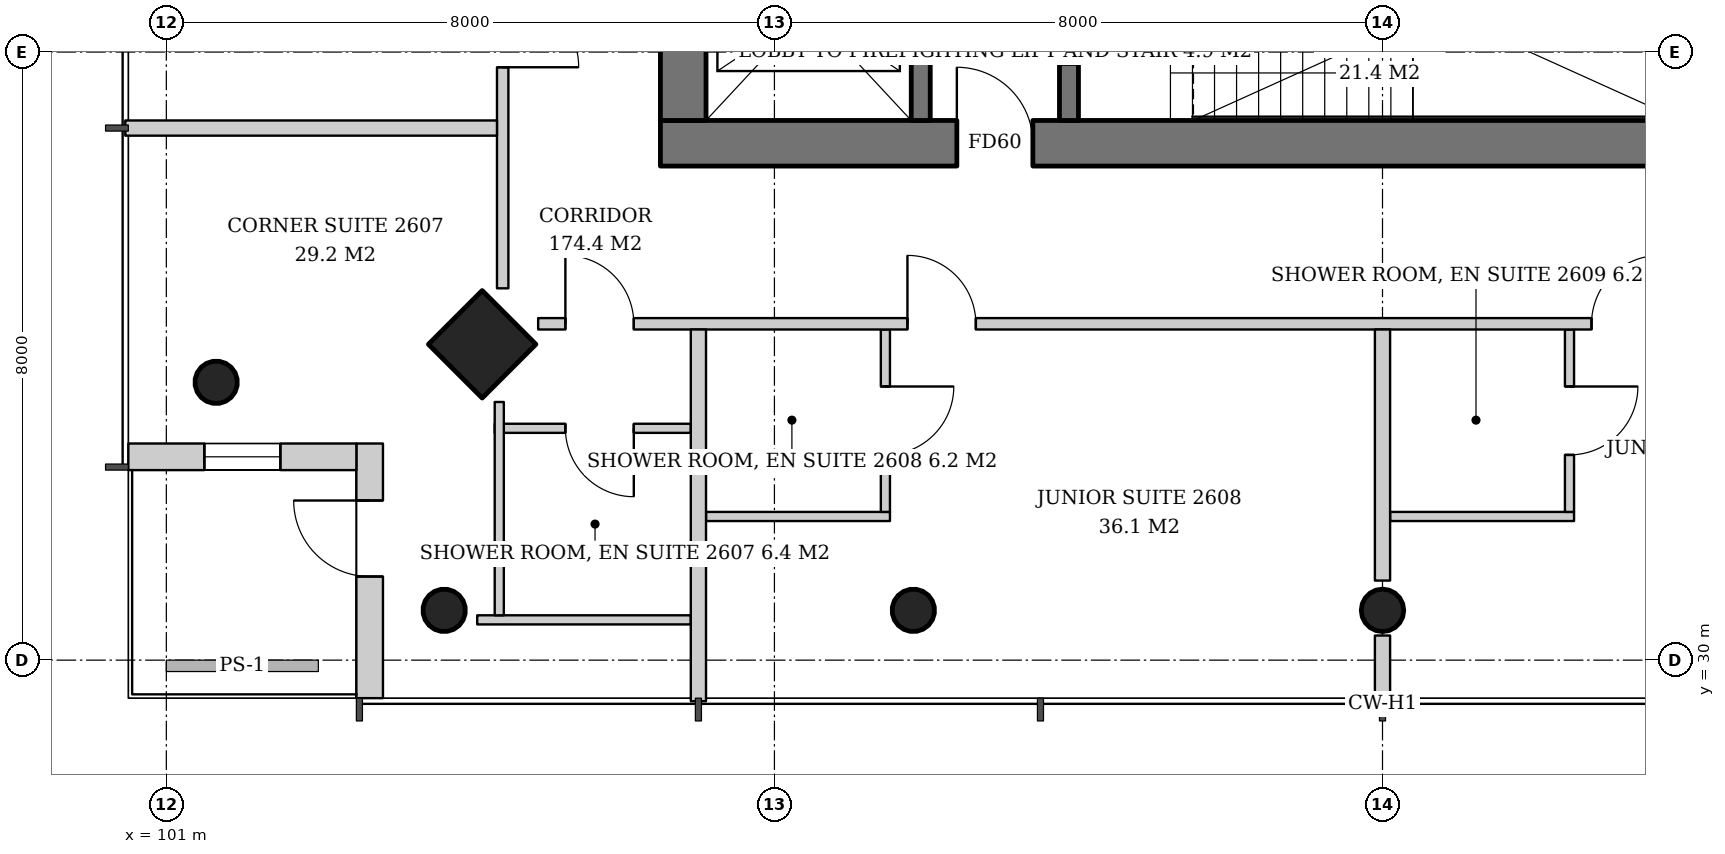
"""IFC4 building model, lengths in metres.
Left out: names, types, materials, properties, quantities, classifications, styles, units other than length and angle.
Written with IfcOpenShell. Run it as: python <this file> out.ifc"""

import sys

from ifc_helpers import new_model, si_unit, direction, frame, frame_2d, origin, origin_2d, place, context, subcontext, project, spatial, rectangle, hollow_circle, extrude, element, fill, save


model = new_model("IFC4")
c1 = context("Model", 3, precision=1e-05, world=origin(), true_north=direction((0.0, 1.0)))
c2 = subcontext(c1, "Body", "Model", "MODEL_VIEW")
j1 = project(units=[si_unit("LENGTHUNIT", "METRE"), si_unit("PLANEANGLEUNIT", "RADIAN")], contexts=[c1])
p1 = place(None, origin())
s1 = spatial("IfcSite", under=j1, at=p1, CompositionType="ELEMENT")
p2 = place(p1, origin())
s2 = spatial("IfcBuilding", under=s1, at=p2, CompositionType="ELEMENT")
p3 = place(p2, frame((0.0, 0.0, 104.6)))
s3 = spatial("IfcBuildingStorey", under=s2, at=p3, CompositionType="ELEMENT", Elevation=104.6)
p4 = place(p3, frame((105.104, 34.104, 0.0), z_axis=(0.043032401563, 0.043032401563, 0.998146494675), x_axis=(-0.707106781187, 0.707106781187, 0.0)))
e1 = element("IfcColumn", 1, at=p4, inside=s3, PredefinedType="COLUMN", context=c2, shape_type="SweptSolid", body=[
    extrude(rectangle(XDim=1.0, YDim=1.0, at=origin_2d()), origin(), (0.0, 0.0, 1.0), 3.807),
])
for number, where, z_axis, x_axis in (
    (2, (101.604, 33.604, 0.0), (0.043, 0.043, 0.998), (-0.707, 0.707, 0.0)),
    (3, (104.604, 30.604, 0.0), (0.043, 0.043, 0.998), (-0.707, 0.707, 0.0)),
):
    element("IfcColumn", number, at=place(p3, frame(where, z_axis=z_axis, x_axis=x_axis)), inside=s3, PredefinedType="COLUMN", context=c2, shape_type="SweptSolid", body=[
        extrude(hollow_circle(Radius=0.28, WallThickness=0.02, at=origin_2d()), origin(), (0.0, 0.0, 1.0), 3.807),
    ])
p5 = place(p3, frame((110.802, 30.604, 0.0), z_axis=(0.02149908433, 0.04306234503, 0.998841040313), x_axis=(-0.894693706707, 0.446680166538, 0.0)))
e4 = element("IfcColumn", 4, at=p5, inside=s3, PredefinedType="COLUMN", context=c2, shape_type="SweptSolid", body=[
    extrude(hollow_circle(Radius=0.28, WallThickness=0.02, at=origin_2d()), origin(), (0.0, 0.0, 1.0), 3.804),
])
p6 = place(p3, frame((117.0, 30.604, 0.0), z_axis=(0.0, 0.043072300418, 0.999071957837), x_axis=(-1.0, 0.0, 0.0)))
e5 = element("IfcColumn", 5, at=p6, inside=s3, PredefinedType="COLUMN", context=c2, shape_type="SweptSolid", body=[
    extrude(hollow_circle(Radius=0.28, WallThickness=0.02, at=origin_2d()), origin(), (0.0, 0.0, 1.0), 3.803),
])
p7 = place(p3, frame((107.5, 36.8, 0.0), z_axis=(0.0, 0.0, 1.0), x_axis=(1.0, 0.0, 0.0)))
e6 = element("IfcWall", 6, at=p7, inside=s3, PredefinedType="SHEAR", context=c2, shape_type="SweptSolid", body=[
    extrude(rectangle(XDim=19.0, YDim=0.6, at=frame_2d((9.5, 0.0))), origin(), (0.0, 0.0, 1.0), 3.8),
])
p8 = place(p7, frame((3.9, 0.0, 0.0)))
e7 = element("IfcOpeningElement", 7, at=p8, cuts=e6, PredefinedType="OPENING", context=c2, shape_type="SweptSolid", body=[
    extrude(rectangle(XDim=1.0, YDim=2.1, at=frame_2d((0.5, 1.05))), frame((0.0, 0.31, 0.0), z_axis=(0.0, -1.0, 0.0), x_axis=(1.0, 0.0, 0.0)), (0.0, 0.0, 1.0), 0.62),
])
p9 = place(p7, frame((14.792, 0.0, 0.0)))
e8 = element("IfcOpeningElement", 8, at=p9, cuts=e6, PredefinedType="OPENING", context=c2, shape_type="SweptSolid", body=[
    extrude(rectangle(XDim=1.0, YDim=2.1, at=frame_2d((0.5, 1.05))), frame((0.0, 0.31, 0.0), z_axis=(0.0, -1.0, 0.0), x_axis=(1.0, 0.0, 0.0)), (0.0, 0.0, 1.0), 0.62),
])
p10 = place(p7, frame((17.005, 0.0, 0.0)))
e9 = element("IfcOpeningElement", 9, at=p10, cuts=e6, PredefinedType="OPENING", context=c2, shape_type="SweptSolid", body=[
    extrude(rectangle(XDim=1.0, YDim=2.1, at=frame_2d((0.5, 1.05))), frame((0.0, 0.31, 0.0), z_axis=(0.0, -1.0, 0.0), x_axis=(1.0, 0.0, 0.0)), (0.0, 0.0, 1.0), 0.62),
])
p11 = place(p3, frame((107.8, 37.1, 0.0), z_axis=(0.0, 0.0, 1.0), x_axis=(0.0, 1.0, 0.0)))
e10 = element("IfcWall", 10, at=p11, inside=s3, PredefinedType="SHEAR", context=c2, shape_type="SweptSolid", body=[
    extrude(rectangle(XDim=17.8, YDim=0.6, at=frame_2d((8.9, 0.0))), origin(), (0.0, 0.0, 1.0), 3.8),
])
p12 = place(p11, frame((8.0, 0.0, 0.0)))
e11 = element("IfcOpeningElement", 11, at=p12, cuts=e10, PredefinedType="OPENING", context=c2, shape_type="SweptSolid", body=[
    extrude(rectangle(XDim=1.8, YDim=2.4, at=frame_2d((0.9, 1.2))), frame((0.0, 0.31, 0.0), z_axis=(0.0, -1.0, 0.0), x_axis=(1.0, 0.0, 0.0)), (0.0, 0.0, 1.0), 0.62),
])
p13 = place(p3, frame((103.675, 29.5, 0.0), z_axis=(0.0, 0.0, 1.0), x_axis=(0.0, 1.0, 0.0)))
e12 = element("IfcWall", 12, at=p13, inside=s3, PredefinedType="SOLIDWALL", context=c2, shape_type="SweptSolid", body=[
    extrude(rectangle(XDim=3.35, YDim=0.35, at=frame_2d((1.675, 0.0))), origin(), (0.0, 0.0, 1.0), 3.6),
])
p14 = place(p13, frame((1.6, 0.0, 0.0)))
e13 = element("IfcOpeningElement", 13, at=p14, cuts=e12, PredefinedType="OPENING", context=c2, shape_type="SweptSolid", body=[
    extrude(rectangle(XDim=1.0, YDim=2.4, at=frame_2d((0.5, 1.2))), frame((0.0, 0.185, 0.0), z_axis=(0.0, -1.0, 0.0), x_axis=(1.0, 0.0, 0.0)), (0.0, 0.0, 1.0), 0.37),
])
p15 = place(p3, frame((103.5, 32.675, 0.0), z_axis=(0.0, 0.0, 1.0), x_axis=(-1.0, 0.0, 0.0)))
e14 = element("IfcWall", 14, at=p15, inside=s3, PredefinedType="SOLIDWALL", context=c2, shape_type="SweptSolid", body=[
    extrude(rectangle(XDim=3.0, YDim=0.35, at=frame_2d((1.5, 0.0))), origin(), (0.0, 0.0, 1.0), 3.6),
])
p16 = place(p15, frame((1.0, 0.0, 0.9)))
e15 = element("IfcOpeningElement", 15, at=p16, cuts=e14, PredefinedType="OPENING", context=c2, shape_type="SweptSolid", body=[
    extrude(rectangle(XDim=1.0, YDim=2.4, at=frame_2d((0.5, 1.2))), frame((0.0, 0.185, 0.0), z_axis=(0.0, -1.0, 0.0), x_axis=(1.0, 0.0, 0.0)), (0.0, 0.0, 1.0), 0.37),
])
p17 = place(p3, frame((110.925, 37.1, 0.0), z_axis=(0.0, 0.0, 1.0), x_axis=(0.0, 1.0, 0.0)))
e16 = element("IfcWall", 16, at=p17, inside=s3, PredefinedType="SHEAR", context=c2, shape_type="SweptSolid", body=[
    extrude(rectangle(XDim=2.9, YDim=0.25, at=frame_2d((1.45, 0.0))), origin(), (0.0, 0.0, 1.0), 3.8),
])
p18 = place(p17, frame((0.8, 0.0, 0.0)))
e17 = element("IfcOpeningElement", 17, at=p18, cuts=e16, PredefinedType="OPENING", context=c2, shape_type="SweptSolid", body=[
    extrude(rectangle(XDim=1.3, YDim=2.2, at=frame_2d((0.65, 1.1))), frame((0.0, 0.135, 0.0), z_axis=(0.0, -1.0, 0.0), x_axis=(1.0, 0.0, 0.0)), (0.0, 0.0, 1.0), 0.27),
])
p19 = place(p3, frame((112.875, 37.1, 0.0), z_axis=(0.0, 0.0, 1.0), x_axis=(0.0, 1.0, 0.0)))
e18 = element("IfcWall", 18, at=p19, inside=s3, PredefinedType="SHEAR", context=c2, shape_type="SweptSolid", body=[
    extrude(rectangle(XDim=2.9, YDim=0.25, at=frame_2d((1.45, 0.0))), origin(), (0.0, 0.0, 1.0), 3.8),
])
p20 = place(p19, frame((0.75, 0.0, 0.0)))
e19 = element("IfcOpeningElement", 19, at=p20, cuts=e18, PredefinedType="OPENING", context=c2, shape_type="SweptSolid", body=[
    extrude(rectangle(XDim=1.2, YDim=2.1, at=frame_2d((0.6, 1.05))), frame((0.0, 0.135, 0.0), z_axis=(0.0, -1.0, 0.0), x_axis=(1.0, 0.0, 0.0)), (0.0, 0.0, 1.0), 0.27),
])
p21 = place(p3, frame((105.425, 57.108, 0.0), z_axis=(0.0, 0.0, 1.0), x_axis=(0.0, -1.0, 0.0)))
e20 = element("IfcWall", 20, at=p21, inside=s3, PredefinedType="PARTITIONING", context=c2, shape_type="SweptSolid", body=[
    extrude(rectangle(XDim=22.217, YDim=0.15, at=frame_2d((11.108, 0.0))), origin(), (0.0, 0.0, 1.0), 2.9),
])
p22 = place(p21, frame((0.358, 0.0, 0.0)))
e21 = element("IfcOpeningElement", 21, at=p22, cuts=e20, PredefinedType="OPENING", context=c2, shape_type="SweptSolid", body=[
    extrude(rectangle(XDim=0.9, YDim=2.1, at=frame_2d((0.45, 1.05))), frame((0.0, 0.085, 0.0), z_axis=(0.0, -1.0, 0.0), x_axis=(1.0, 0.0, 0.0)), (0.0, 0.0, 1.0), 0.17),
])
p23 = place(p21, frame((4.858, 0.0, 0.0)))
e22 = element("IfcOpeningElement", 22, at=p23, cuts=e20, PredefinedType="OPENING", context=c2, shape_type="SweptSolid", body=[
    extrude(rectangle(XDim=0.9, YDim=2.1, at=frame_2d((0.45, 1.05))), frame((0.0, 0.085, 0.0), z_axis=(0.0, -1.0, 0.0), x_axis=(1.0, 0.0, 0.0)), (0.0, 0.0, 1.0), 0.17),
])
p24 = place(p21, frame((12.858, 0.0, 0.0)))
e23 = element("IfcOpeningElement", 23, at=p24, cuts=e20, PredefinedType="OPENING", context=c2, shape_type="SweptSolid", body=[
    extrude(rectangle(XDim=1.0, YDim=2.1, at=frame_2d((0.5, 1.05))), frame((0.0, 0.085, 0.0), z_axis=(0.0, -1.0, 0.0), x_axis=(1.0, 0.0, 0.0)), (0.0, 0.0, 1.0), 0.17),
])
p25 = place(p21, frame((18.308, 0.0, 0.0)))
e24 = element("IfcOpeningElement", 24, at=p25, cuts=e20, PredefinedType="OPENING", context=c2, shape_type="SweptSolid", body=[
    extrude(rectangle(XDim=1.0, YDim=2.1, at=frame_2d((0.5, 1.05))), frame((0.0, 0.085, 0.0), z_axis=(0.0, -1.0, 0.0), x_axis=(1.0, 0.0, 0.0)), (0.0, 0.0, 1.0), 0.17),
])
p26 = place(p3, frame((105.35, 37.0, 0.0), z_axis=(0.0, 0.0, 1.0), x_axis=(-1.0, 0.0, 0.0)))
e25 = element("IfcWall", 25, at=p26, inside=s3, PredefinedType="PARTITIONING", context=c2, shape_type="SweptSolid", body=[
    extrude(rectangle(XDim=4.89, YDim=0.2, at=frame_2d((2.445, 0.0))), origin(), (0.0, 0.0, 1.0), 3.2),
])
p27 = place(p3, frame((107.9, 33.05, 0.0), z_axis=(0.0, 0.0, 1.0), x_axis=(-1.0, 0.0, 0.0)))
e26 = element("IfcWall", 26, at=p27, inside=s3, PredefinedType="PARTITIONING", context=c2, shape_type="SweptSolid", body=[
    extrude(rectangle(XDim=2.58, YDim=0.12, at=frame_2d((1.29, 0.0))), origin(), (0.0, 0.0, 1.0), 2.9),
])
p28 = place(p27, frame((0.75, 0.0, 0.0)))
e27 = element("IfcOpeningElement", 27, at=p28, cuts=e26, PredefinedType="OPENING", context=c2, shape_type="SweptSolid", body=[
    extrude(rectangle(XDim=0.9, YDim=2.1, at=frame_2d((0.45, 1.05))), frame((0.0, 0.07, 0.0), z_axis=(0.0, -1.0, 0.0), x_axis=(1.0, 0.0, 0.0)), (0.0, 0.0, 1.0), 0.14),
])
p29 = place(p3, frame((107.9, 30.53, 0.0), z_axis=(0.0, 0.0, 1.0), x_axis=(-1.0, 0.0, 0.0)))
e28 = element("IfcWall", 28, at=p29, inside=s3, PredefinedType="PARTITIONING", context=c2, shape_type="SweptSolid", body=[
    extrude(rectangle(XDim=2.81, YDim=0.12, at=frame_2d((1.405, 0.0))), origin(), (0.0, 0.0, 1.0), 3.6),
])
p30 = place(p3, frame((105.38, 33.396, 0.0), z_axis=(0.0, 0.0, 1.0), x_axis=(0.0, -1.0, 0.0)))
e29 = element("IfcWall", 29, at=p30, inside=s3, PredefinedType="PARTITIONING", context=c2, shape_type="SweptSolid", body=[
    extrude(rectangle(XDim=2.806, YDim=0.12, at=frame_2d((1.403, 0.0))), origin(), (0.0, 0.0, 1.0), 3.2),
])
p31 = place(p3, frame((108.1, 31.89, 0.0), z_axis=(0.0, 0.0, 1.0), x_axis=(1.0, 0.0, 0.0)))
e30 = element("IfcWall", 30, at=p31, inside=s3, PredefinedType="PARTITIONING", context=c2, shape_type="SweptSolid", body=[
    extrude(rectangle(XDim=2.42, YDim=0.12, at=frame_2d((1.21, 0.0))), origin(), (0.0, 0.0, 1.0), 3.6),
])
p32 = place(p3, frame((110.46, 34.35, 0.0), z_axis=(0.0, 0.0, 1.0), x_axis=(0.0, -1.0, 0.0)))
e31 = element("IfcWall", 31, at=p32, inside=s3, PredefinedType="PARTITIONING", context=c2, shape_type="SweptSolid", body=[
    extrude(rectangle(XDim=2.4, YDim=0.12, at=frame_2d((1.2, 0.0))), origin(), (0.0, 0.0, 1.0), 3.6),
])
p33 = place(p32, frame((0.75, 0.0, 0.0)))
e32 = element("IfcOpeningElement", 32, at=p33, cuts=e31, PredefinedType="OPENING", context=c2, shape_type="SweptSolid", body=[
    extrude(rectangle(XDim=0.9, YDim=2.1, at=frame_2d((0.45, 1.05))), frame((0.0, 0.07, 0.0), z_axis=(0.0, -1.0, 0.0), x_axis=(1.0, 0.0, 0.0)), (0.0, 0.0, 1.0), 0.14),
])
p34 = place(p3, frame((117.1, 31.89, 0.0), z_axis=(0.0, 0.0, 1.0), x_axis=(1.0, 0.0, 0.0)))
e33 = element("IfcWall", 33, at=p34, inside=s3, PredefinedType="PARTITIONING", context=c2, shape_type="SweptSolid", body=[
    extrude(rectangle(XDim=2.42, YDim=0.12, at=frame_2d((1.21, 0.0))), origin(), (0.0, 0.0, 1.0), 3.6),
])
p35 = place(p3, frame((119.46, 34.35, 0.0), z_axis=(0.0, 0.0, 1.0), x_axis=(0.0, -1.0, 0.0)))
e34 = element("IfcWall", 34, at=p35, inside=s3, PredefinedType="PARTITIONING", context=c2, shape_type="SweptSolid", body=[
    extrude(rectangle(XDim=2.4, YDim=0.12, at=frame_2d((1.2, 0.0))), origin(), (0.0, 0.0, 1.0), 3.6),
])
p36 = place(p35, frame((0.75, 0.0, 0.0)))
e35 = element("IfcOpeningElement", 35, at=p36, cuts=e34, PredefinedType="OPENING", context=c2, shape_type="SweptSolid", body=[
    extrude(rectangle(XDim=0.9, YDim=2.1, at=frame_2d((0.45, 1.05))), frame((0.0, 0.07, 0.0), z_axis=(0.0, -1.0, 0.0), x_axis=(1.0, 0.0, 0.0)), (0.0, 0.0, 1.0), 0.14),
])
p37 = place(p3, frame((105.892, 34.425, 0.0), z_axis=(0.0, 0.0, 1.0), x_axis=(1.0, 0.0, 0.0)))
e36 = element("IfcWall", 36, at=p37, inside=s3, PredefinedType="PARTITIONING", context=c2, shape_type="SweptSolid", body=[
    extrude(rectangle(XDim=22.217, YDim=0.15, at=frame_2d((11.108, 0.0))), origin(), (0.0, 0.0, 1.0), 2.9),
])
p38 = place(p37, frame((0.358, 0.0, 0.0)))
e37 = element("IfcOpeningElement", 37, at=p38, cuts=e36, PredefinedType="OPENING", context=c2, shape_type="SweptSolid", body=[
    extrude(rectangle(XDim=0.9, YDim=2.1, at=frame_2d((0.45, 1.05))), frame((0.0, 0.085, 0.0), z_axis=(0.0, -1.0, 0.0), x_axis=(1.0, 0.0, 0.0)), (0.0, 0.0, 1.0), 0.17),
])
p39 = place(p37, frame((4.858, 0.0, 0.0)))
e38 = element("IfcOpeningElement", 38, at=p39, cuts=e36, PredefinedType="OPENING", context=c2, shape_type="SweptSolid", body=[
    extrude(rectangle(XDim=0.9, YDim=2.1, at=frame_2d((0.45, 1.05))), frame((0.0, 0.085, 0.0), z_axis=(0.0, -1.0, 0.0), x_axis=(1.0, 0.0, 0.0)), (0.0, 0.0, 1.0), 0.17),
])
p40 = place(p37, frame((13.858, 0.0, 0.0)))
e39 = element("IfcOpeningElement", 39, at=p40, cuts=e36, PredefinedType="OPENING", context=c2, shape_type="SweptSolid", body=[
    extrude(rectangle(XDim=0.9, YDim=2.1, at=frame_2d((0.45, 1.05))), frame((0.0, 0.085, 0.0), z_axis=(0.0, -1.0, 0.0), x_axis=(1.0, 0.0, 0.0)), (0.0, 0.0, 1.0), 0.17),
])
p41 = place(p3, frame((108.0, 34.35, 0.0), z_axis=(0.0, 0.0, 1.0), x_axis=(0.0, -1.0, 0.0)))
e40 = element("IfcWall", 40, at=p41, inside=s3, PredefinedType="PARTITIONING", context=c2, shape_type="SweptSolid", body=[
    extrude(rectangle(XDim=4.89, YDim=0.2, at=frame_2d((2.445, 0.0))), origin(), (0.0, 0.0, 1.0), 2.9),
])
p42 = place(p3, frame((117.0, 34.35, 0.0), z_axis=(0.0, 0.0, 1.0), x_axis=(0.0, -1.0, 0.0)))
e41 = element("IfcWall", 41, at=p42, inside=s3, PredefinedType="PARTITIONING", context=c2, shape_type="SweptSolid", body=[
    extrude(rectangle(XDim=3.303, YDim=0.2, at=frame_2d((1.652, 0.0))), origin(), (0.0, 0.0, 1.0), 3.6),
])
p43 = place(p3, frame((117.0, 30.324, 0.0), z_axis=(0.0, 0.0, 1.0), x_axis=(0.0, -1.0, 0.0)))
e42 = element("IfcWall", 42, at=p43, inside=s3, PredefinedType="PARTITIONING", context=c2, shape_type="SweptSolid", body=[
    extrude(rectangle(XDim=0.864, YDim=0.2, at=frame_2d((0.432, 0.0))), origin(), (0.0, 0.0, 1.0), 3.6),
])
p44 = place(p14, origin())
e43 = element("IfcDoor", 43, at=p44, inside=s3, OperationType="SINGLE_SWING_RIGHT", PredefinedType="DOOR", context=c2, shape_type="SweptSolid", body=[
    extrude(rectangle(XDim=1.0, YDim=2.4, at=frame_2d((0.5, 1.2))), frame((0.0, 0.025, 0.0), z_axis=(0.0, -1.0, 0.0), x_axis=(1.0, 0.0, 0.0)), (0.0, 0.0, 1.0), 0.05),
])
fill(e13, e43)
p45 = place(p16, origin())
e44 = element("IfcWindow", 44, at=p45, inside=s3, PartitioningType="SINGLE_PANEL", PredefinedType="WINDOW", context=c2, shape_type="SweptSolid", body=[
    extrude(rectangle(XDim=1.0, YDim=2.4, at=frame_2d((0.5, 1.2))), frame((0.0, 0.03, 0.0), z_axis=(0.0, -1.0, 0.0), x_axis=(1.0, 0.0, 0.0)), (0.0, 0.0, 1.0), 0.06),
])
fill(e15, e44)
p46 = place(p18, origin())
e45 = element("IfcDoor", 45, at=p46, inside=s3, OperationType="DOUBLE_DOOR_SLIDING", PredefinedType="DOOR", context=c2, shape_type="SweptSolid", body=[
    extrude(rectangle(XDim=1.3, YDim=2.2, at=frame_2d((0.65, 1.1))), frame((0.0, 0.025, 0.0), z_axis=(0.0, -1.0, 0.0), x_axis=(1.0, 0.0, 0.0)), (0.0, 0.0, 1.0), 0.05),
])
fill(e17, e45)
p47 = place(p20, origin())
e46 = element("IfcDoor", 46, at=p47, inside=s3, OperationType="SINGLE_SWING_LEFT", PredefinedType="DOOR", context=c2, shape_type="SweptSolid", body=[
    extrude(rectangle(XDim=1.2, YDim=2.1, at=frame_2d((0.6, 1.05))), frame((0.0, 0.025, 0.0), z_axis=(0.0, -1.0, 0.0), x_axis=(1.0, 0.0, 0.0)), (0.0, 0.0, 1.0), 0.05),
])
fill(e19, e46)
p48 = place(p8, origin())
e47 = element("IfcDoor", 47, at=p48, inside=s3, OperationType="SINGLE_SWING_LEFT", PredefinedType="DOOR", context=c2, shape_type="SweptSolid", body=[
    extrude(rectangle(XDim=1.0, YDim=2.1, at=frame_2d((0.5, 1.05))), frame((0.0, 0.025, 0.0), z_axis=(0.0, -1.0, 0.0), x_axis=(1.0, 0.0, 0.0)), (0.0, 0.0, 1.0), 0.05),
])
fill(e7, e47)
p49 = place(p25, origin())
e48 = element("IfcDoor", 48, at=p49, inside=s3, OperationType="SINGLE_SWING_RIGHT", PredefinedType="DOOR", context=c2, shape_type="SweptSolid", body=[
    extrude(rectangle(XDim=1.0, YDim=2.1, at=frame_2d((0.5, 1.05))), frame((0.0, 0.025, 0.0), z_axis=(0.0, -1.0, 0.0), x_axis=(1.0, 0.0, 0.0)), (0.0, 0.0, 1.0), 0.05),
])
fill(e24, e48)
p50 = place(p28, origin())
e49 = element("IfcDoor", 49, at=p50, inside=s3, OperationType="SINGLE_SWING_LEFT", PredefinedType="DOOR", context=c2, shape_type="SweptSolid", body=[
    extrude(rectangle(XDim=0.9, YDim=2.1, at=frame_2d((0.45, 1.05))), frame((0.0, 0.025, 0.0), z_axis=(0.0, -1.0, 0.0), x_axis=(1.0, 0.0, 0.0)), (0.0, 0.0, 1.0), 0.05),
])
fill(e27, e49)
p51 = place(p33, origin())
e50 = element("IfcDoor", 50, at=p51, inside=s3, OperationType="SINGLE_SWING_LEFT", PredefinedType="DOOR", context=c2, shape_type="SweptSolid", body=[
    extrude(rectangle(XDim=0.9, YDim=2.1, at=frame_2d((0.45, 1.05))), frame((0.0, 0.025, 0.0), z_axis=(0.0, -1.0, 0.0), x_axis=(1.0, 0.0, 0.0)), (0.0, 0.0, 1.0), 0.05),
])
fill(e32, e50)
p52 = place(p36, origin())
e51 = element("IfcDoor", 51, at=p52, inside=s3, OperationType="SINGLE_SWING_LEFT", PredefinedType="DOOR", context=c2, shape_type="SweptSolid", body=[
    extrude(rectangle(XDim=0.9, YDim=2.1, at=frame_2d((0.45, 1.05))), frame((0.0, 0.025, 0.0), z_axis=(0.0, -1.0, 0.0), x_axis=(1.0, 0.0, 0.0)), (0.0, 0.0, 1.0), 0.05),
])
fill(e35, e51)
p53 = place(p38, origin())
e52 = element("IfcDoor", 52, at=p53, inside=s3, OperationType="SINGLE_SWING_LEFT", PredefinedType="DOOR", context=c2, shape_type="SweptSolid", body=[
    extrude(rectangle(XDim=0.9, YDim=2.1, at=frame_2d((0.45, 1.05))), frame((0.0, 0.025, 0.0), z_axis=(0.0, -1.0, 0.0), x_axis=(1.0, 0.0, 0.0)), (0.0, 0.0, 1.0), 0.05),
])
fill(e37, e52)
p54 = place(p39, origin())
e53 = element("IfcDoor", 53, at=p54, inside=s3, OperationType="SINGLE_SWING_LEFT", PredefinedType="DOOR", context=c2, shape_type="SweptSolid", body=[
    extrude(rectangle(XDim=0.9, YDim=2.1, at=frame_2d((0.45, 1.05))), frame((0.0, 0.025, 0.0), z_axis=(0.0, -1.0, 0.0), x_axis=(1.0, 0.0, 0.0)), (0.0, 0.0, 1.0), 0.05),
])
fill(e38, e53)
p55 = place(p40, origin())
e54 = element("IfcDoor", 54, at=p55, inside=s3, OperationType="SINGLE_SWING_RIGHT", PredefinedType="DOOR", context=c2, shape_type="SweptSolid", body=[
    extrude(rectangle(XDim=0.9, YDim=2.1, at=frame_2d((0.45, 1.05))), frame((0.0, 0.025, 0.0), z_axis=(0.0, -1.0, 0.0), x_axis=(1.0, 0.0, 0.0)), (0.0, 0.0, 1.0), 0.05),
])
fill(e39, e54)
save(model, sys.argv[1])
